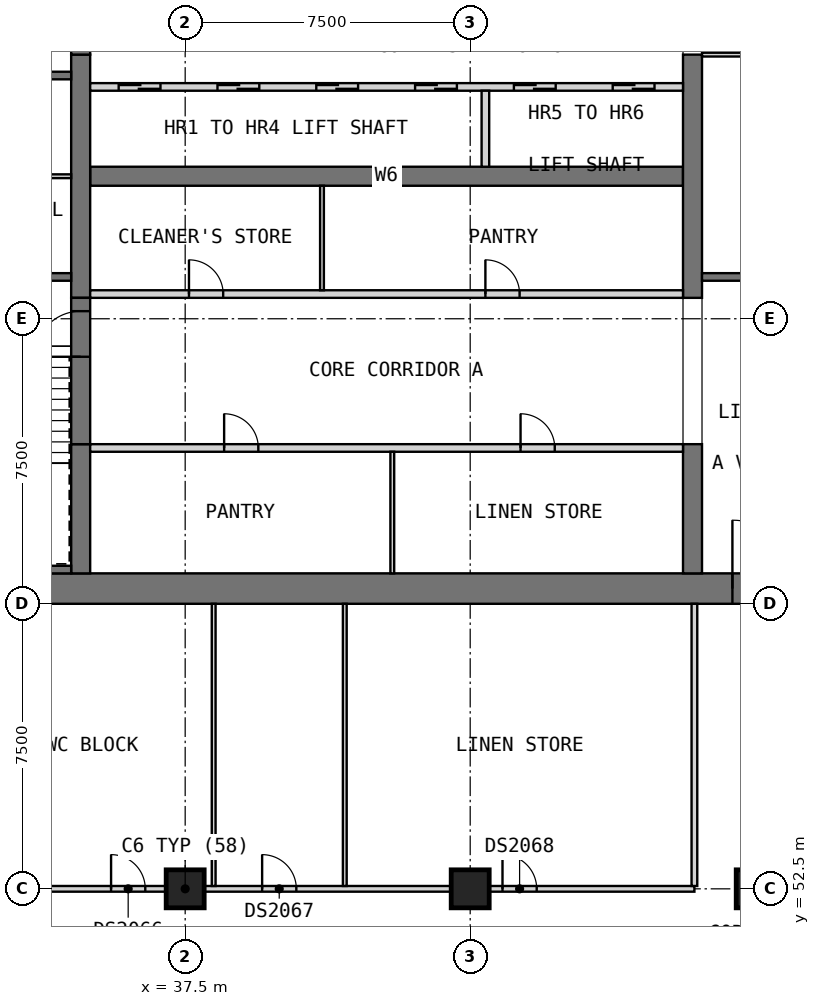
"""IFC4 building model, lengths in metres.
Left out: names, types, materials, properties, quantities, classifications, styles, units other than length and angle.
Written with IfcOpenShell. Run it as: python <this file> out.ifc"""

import sys

from ifc_helpers import new_model, si_unit, direction, frame, frame_2d, origin, origin_2d, place, context, subcontext, project, spatial, rectangle, extrude, element, fill, save


model = new_model("IFC4")
c1 = context("Model", 3, precision=1e-05, world=origin(), true_north=direction((0.0, 1.0)))
c2 = subcontext(c1, "Body", "Model", "MODEL_VIEW")
j1 = project(units=[si_unit("LENGTHUNIT", "METRE"), si_unit("PLANEANGLEUNIT", "RADIAN")], contexts=[c1])
p1 = place(None, origin())
s1 = spatial("IfcSite", under=j1, at=p1, CompositionType="ELEMENT")
p2 = place(p1, origin())
s2 = spatial("IfcBuilding", under=s1, at=p2, CompositionType="ELEMENT")
p3 = place(p2, frame((0.0, 0.0, 133.8)))
s3 = spatial("IfcBuildingStorey", under=s2, at=p3, CompositionType="ELEMENT", Elevation=133.8)
for number, where, z_axis, x_axis in (
    (1, (37.5, 52.5, 0.0), (0.0, 0.0, 1.0), (1.0, 0.0, 0.0)),
    (2, (45.0, 52.5, 0.0), (0.0, 0.0, 1.0), (1.0, 0.0, 0.0)),
    (3, (52.5, 52.5, 0.0), (0.0, 0.0, 1.0), (1.0, 0.0, 0.0)),
):
    element("IfcColumn", number, at=place(p3, frame(where, z_axis=z_axis, x_axis=x_axis)), inside=s3, PredefinedType="COLUMN", context=c2, shape_type="SweptSolid", body=[
        extrude(rectangle(XDim=1.0, YDim=1.0, at=origin_2d()), origin(), (0.0, 0.0, 1.0), 3.6),
    ])
p4 = place(p3, frame((30.0, 60.4, 0.0), z_axis=(0.0, 0.0, 1.0), x_axis=(1.0, 0.0, 0.0)))
e4 = element("IfcWall", 4, at=p4, inside=s3, PredefinedType="SHEAR", context=c2, shape_type="SweptSolid", body=[
    extrude(rectangle(XDim=30.0, YDim=0.8, at=frame_2d((15.0, 0.0))), origin(), (0.0, 0.0, 1.0), 3.6),
])
p5 = place(p4, frame((21.9, 0.0, 0.0)))
e5 = element("IfcOpeningElement", 5, at=p5, cuts=e4, PredefinedType="OPENING", context=c2, shape_type="SweptSolid", body=[
    extrude(rectangle(XDim=1.8, YDim=2.1, at=frame_2d((0.9, 1.05))), frame((0.0, 0.41, 0.0), z_axis=(0.0, -1.0, 0.0), x_axis=(1.0, 0.0, 0.0)), (0.0, 0.0, 1.0), 0.82),
])
p6 = place(p4, frame((26.5, 0.0, 0.0)))
e6 = element("IfcOpeningElement", 6, at=p6, cuts=e4, PredefinedType="OPENING", context=c2, shape_type="SweptSolid", body=[
    extrude(rectangle(XDim=1.2, YDim=2.1, at=frame_2d((0.6, 1.05))), frame((0.0, 0.41, 0.0), z_axis=(0.0, -1.0, 0.0), x_axis=(1.0, 0.0, 0.0)), (0.0, 0.0, 1.0), 0.82),
])
p7 = place(p3, frame((35.0, 71.25, 0.0), z_axis=(0.0, 0.0, 1.0), x_axis=(1.0, 0.0, 0.0)))
e7 = element("IfcWall", 7, at=p7, inside=s3, PredefinedType="SHEAR", context=c2, shape_type="SweptSolid", body=[
    extrude(rectangle(XDim=15.6, YDim=0.5, at=frame_2d((7.8, 0.0))), origin(), (0.0, 0.0, 1.0), 3.6),
])
p8 = place(p3, frame((34.75, 60.8, 0.0), z_axis=(0.0, 0.0, 1.0), x_axis=(0.0, 1.0, 0.0)))
e8 = element("IfcWall", 8, at=p8, inside=s3, PredefinedType="SHEAR", context=c2, shape_type="SweptSolid", body=[
    extrude(rectangle(XDim=3.4, YDim=0.5, at=frame_2d((1.7, 0.0))), origin(), (0.0, 0.0, 1.0), 3.6),
])
p9 = place(p3, frame((34.75, 68.05, 0.0), z_axis=(0.0, 0.0, 1.0), x_axis=(0.0, 1.0, 0.0)))
e9 = element("IfcWall", 9, at=p9, inside=s3, PredefinedType="SHEAR", context=c2, shape_type="SweptSolid", body=[
    extrude(rectangle(XDim=6.4, YDim=0.5, at=frame_2d((3.2, 0.0))), origin(), (0.0, 0.0, 1.0), 3.6),
])
p10 = place(p3, frame((50.85, 60.8, 0.0), z_axis=(0.0, 0.0, 1.0), x_axis=(0.0, 1.0, 0.0)))
e10 = element("IfcWall", 10, at=p10, inside=s3, PredefinedType="SHEAR", context=c2, shape_type="SweptSolid", body=[
    extrude(rectangle(XDim=3.4, YDim=0.5, at=frame_2d((1.7, 0.0))), origin(), (0.0, 0.0, 1.0), 3.6),
])
p11 = place(p3, frame((50.85, 68.05, 0.0), z_axis=(0.0, 0.0, 1.0), x_axis=(0.0, 1.0, 0.0)))
e11 = element("IfcWall", 11, at=p11, inside=s3, PredefinedType="SHEAR", context=c2, shape_type="SweptSolid", body=[
    extrude(rectangle(XDim=6.4, YDim=0.5, at=frame_2d((3.2, 0.0))), origin(), (0.0, 0.0, 1.0), 3.6),
])
p12 = place(p3, frame((35.0, 64.1, 0.0), z_axis=(0.0, 0.0, 1.0), x_axis=(1.0, 0.0, 0.0)))
e12 = element("IfcWall", 12, at=p12, inside=s3, PredefinedType="PARTITIONING", context=c2, shape_type="SweptSolid", body=[
    extrude(rectangle(XDim=15.6, YDim=0.2, at=frame_2d((7.8, 0.0))), origin(), (0.0, 0.0, 1.0), 3.35),
])
p13 = place(p12, frame((3.525, 0.0, 0.0)))
e13 = element("IfcOpeningElement", 13, at=p13, cuts=e12, PredefinedType="OPENING", context=c2, shape_type="SweptSolid", body=[
    extrude(rectangle(XDim=0.9, YDim=2.1, at=frame_2d((0.45, 1.05))), frame((0.0, 0.11, 0.0), z_axis=(0.0, -1.0, 0.0), x_axis=(1.0, 0.0, 0.0)), (0.0, 0.0, 1.0), 0.22),
])
p14 = place(p12, frame((11.325, 0.0, 0.0)))
e14 = element("IfcOpeningElement", 14, at=p14, cuts=e12, PredefinedType="OPENING", context=c2, shape_type="SweptSolid", body=[
    extrude(rectangle(XDim=0.9, YDim=2.1, at=frame_2d((0.45, 1.05))), frame((0.0, 0.11, 0.0), z_axis=(0.0, -1.0, 0.0), x_axis=(1.0, 0.0, 0.0)), (0.0, 0.0, 1.0), 0.22),
])
p15 = place(p3, frame((42.95, 60.8, 0.0), z_axis=(0.0, 0.0, 1.0), x_axis=(0.0, 1.0, 0.0)))
e15 = element("IfcWall", 15, at=p15, inside=s3, PredefinedType="PARTITIONING", context=c2, shape_type="SweptSolid", body=[
    extrude(rectangle(XDim=3.2, YDim=0.1, at=frame_2d((1.6, 0.0))), origin(), (0.0, 0.0, 1.0), 3.35),
])
p16 = place(p3, frame((35.0, 68.15, 0.0), z_axis=(0.0, 0.0, 1.0), x_axis=(1.0, 0.0, 0.0)))
e16 = element("IfcWall", 16, at=p16, inside=s3, PredefinedType="PARTITIONING", context=c2, shape_type="SweptSolid", body=[
    extrude(rectangle(XDim=15.6, YDim=0.2, at=frame_2d((7.8, 0.0))), origin(), (0.0, 0.0, 1.0), 3.35),
])
p17 = place(p16, frame((2.6, 0.0, 0.0)))
e17 = element("IfcOpeningElement", 17, at=p17, cuts=e16, PredefinedType="OPENING", context=c2, shape_type="SweptSolid", body=[
    extrude(rectangle(XDim=0.9, YDim=2.1, at=frame_2d((0.45, 1.05))), frame((0.0, 0.11, 0.0), z_axis=(0.0, -1.0, 0.0), x_axis=(1.0, 0.0, 0.0)), (0.0, 0.0, 1.0), 0.22),
])
p18 = place(p16, frame((10.4, 0.0, 0.0)))
e18 = element("IfcOpeningElement", 18, at=p18, cuts=e16, PredefinedType="OPENING", context=c2, shape_type="SweptSolid", body=[
    extrude(rectangle(XDim=0.9, YDim=2.1, at=frame_2d((0.45, 1.05))), frame((0.0, 0.11, 0.0), z_axis=(0.0, -1.0, 0.0), x_axis=(1.0, 0.0, 0.0)), (0.0, 0.0, 1.0), 0.22),
])
p19 = place(p3, frame((41.1, 68.25, 0.0), z_axis=(0.0, 0.0, 1.0), x_axis=(0.0, 1.0, 0.0)))
e19 = element("IfcWall", 19, at=p19, inside=s3, PredefinedType="PARTITIONING", context=c2, shape_type="SweptSolid", body=[
    extrude(rectangle(XDim=2.75, YDim=0.1, at=frame_2d((1.375, 0.0))), origin(), (0.0, 0.0, 1.0), 3.35),
])
p20 = place(p3, frame((35.0, 73.6, 0.0), z_axis=(0.0, 0.0, 1.0), x_axis=(1.0, 0.0, 0.0)))
e20 = element("IfcWall", 20, at=p20, inside=s3, PredefinedType="SOLIDWALL", context=c2, shape_type="SweptSolid", body=[
    extrude(rectangle(XDim=15.6, YDim=0.2, at=frame_2d((7.8, 0.0))), origin(), (0.0, 0.0, 1.0), 3.6),
])
p21 = place(p20, frame((0.75, 0.0, 0.0)))
e21 = element("IfcOpeningElement", 21, at=p21, cuts=e20, PredefinedType="OPENING", context=c2, shape_type="SweptSolid", body=[
    extrude(rectangle(XDim=1.1, YDim=2.1, at=frame_2d((0.55, 1.05))), frame((0.0, 0.11, 0.0), z_axis=(0.0, -1.0, 0.0), x_axis=(1.0, 0.0, 0.0)), (0.0, 0.0, 1.0), 0.22),
])
p22 = place(p20, frame((3.35, 0.0, 0.0)))
e22 = element("IfcOpeningElement", 22, at=p22, cuts=e20, PredefinedType="OPENING", context=c2, shape_type="SweptSolid", body=[
    extrude(rectangle(XDim=1.1, YDim=2.1, at=frame_2d((0.55, 1.05))), frame((0.0, 0.11, 0.0), z_axis=(0.0, -1.0, 0.0), x_axis=(1.0, 0.0, 0.0)), (0.0, 0.0, 1.0), 0.22),
])
p23 = place(p20, frame((5.95, 0.0, 0.0)))
e23 = element("IfcOpeningElement", 23, at=p23, cuts=e20, PredefinedType="OPENING", context=c2, shape_type="SweptSolid", body=[
    extrude(rectangle(XDim=1.1, YDim=2.1, at=frame_2d((0.55, 1.05))), frame((0.0, 0.11, 0.0), z_axis=(0.0, -1.0, 0.0), x_axis=(1.0, 0.0, 0.0)), (0.0, 0.0, 1.0), 0.22),
])
p24 = place(p20, frame((8.55, 0.0, 0.0)))
e24 = element("IfcOpeningElement", 24, at=p24, cuts=e20, PredefinedType="OPENING", context=c2, shape_type="SweptSolid", body=[
    extrude(rectangle(XDim=1.1, YDim=2.1, at=frame_2d((0.55, 1.05))), frame((0.0, 0.11, 0.0), z_axis=(0.0, -1.0, 0.0), x_axis=(1.0, 0.0, 0.0)), (0.0, 0.0, 1.0), 0.22),
])
p25 = place(p20, frame((11.15, 0.0, 0.0)))
e25 = element("IfcOpeningElement", 25, at=p25, cuts=e20, PredefinedType="OPENING", context=c2, shape_type="SweptSolid", body=[
    extrude(rectangle(XDim=1.1, YDim=2.1, at=frame_2d((0.55, 1.05))), frame((0.0, 0.11, 0.0), z_axis=(0.0, -1.0, 0.0), x_axis=(1.0, 0.0, 0.0)), (0.0, 0.0, 1.0), 0.22),
])
p26 = place(p20, frame((13.75, 0.0, 0.0)))
e26 = element("IfcOpeningElement", 26, at=p26, cuts=e20, PredefinedType="OPENING", context=c2, shape_type="SweptSolid", body=[
    extrude(rectangle(XDim=1.1, YDim=2.1, at=frame_2d((0.55, 1.05))), frame((0.0, 0.11, 0.0), z_axis=(0.0, -1.0, 0.0), x_axis=(1.0, 0.0, 0.0)), (0.0, 0.0, 1.0), 0.22),
])
p27 = place(p3, frame((45.4, 71.5, 0.0), z_axis=(0.0, 0.0, 1.0), x_axis=(0.0, 1.0, 0.0)))
e27 = element("IfcWall", 27, at=p27, inside=s3, PredefinedType="SOLIDWALL", context=c2, shape_type="SweptSolid", body=[
    extrude(rectangle(XDim=2.0, YDim=0.2, at=frame_2d((1.0, 0.0))), origin(), (0.0, 0.0, 1.0), 3.6),
])
p28 = place(p3, frame((34.75, 64.2, 0.0), z_axis=(0.0, 0.0, 1.0), x_axis=(0.0, 1.0, 0.0)))
e28 = element("IfcWall", 28, at=p28, inside=s3, PredefinedType="SOLIDWALL", context=c2, shape_type="SweptSolid", body=[
    extrude(rectangle(XDim=3.85, YDim=0.5, at=frame_2d((1.925, 0.0))), origin(), (0.0, 0.0, 1.0), 2.4),
])
p29 = place(p28, frame((2.3, 0.0, 0.0)))
e29 = element("IfcOpeningElement", 29, at=p29, cuts=e28, PredefinedType="OPENING", context=c2, shape_type="SweptSolid", body=[
    extrude(rectangle(XDim=1.2, YDim=2.1, at=frame_2d((0.6, 1.05))), frame((0.0, 0.26, 0.0), z_axis=(0.0, -1.0, 0.0), x_axis=(1.0, 0.0, 0.0)), (0.0, 0.0, 1.0), 0.52),
])
p30 = place(p3, frame((34.75, 74.45, 0.0), z_axis=(0.0, 0.0, 1.0), x_axis=(0.0, 1.0, 0.0)))
e30 = element("IfcWall", 30, at=p30, inside=s3, PredefinedType="SOLIDWALL", context=c2, shape_type="SweptSolid", body=[
    extrude(rectangle(XDim=3.85, YDim=0.5, at=frame_2d((1.925, 0.0))), origin(), (0.0, 0.0, 1.0), 2.4),
])
p31 = place(p30, frame((1.0, 0.0, 0.0)))
e31 = element("IfcOpeningElement", 31, at=p31, cuts=e30, PredefinedType="OPENING", context=c2, shape_type="SweptSolid", body=[
    extrude(rectangle(XDim=1.2, YDim=2.1, at=frame_2d((0.6, 1.05))), frame((0.0, 0.26, 0.0), z_axis=(0.0, -1.0, 0.0), x_axis=(1.0, 0.0, 0.0)), (0.0, 0.0, 1.0), 0.52),
])
p32 = place(p3, frame((30.8, 68.6, 0.0), z_axis=(0.0, 0.0, 1.0), x_axis=(1.0, 0.0, 0.0)))
e32 = element("IfcWall", 32, at=p32, inside=s3, PredefinedType="SOLIDWALL", context=c2, shape_type="SweptSolid", body=[
    extrude(rectangle(XDim=3.7, YDim=0.2, at=frame_2d((1.85, 0.0))), origin(), (0.0, 0.0, 1.0), 3.35),
])
p33 = place(p32, frame((1.5, 0.0, 0.0)))
e33 = element("IfcOpeningElement", 33, at=p33, cuts=e32, PredefinedType="OPENING", context=c2, shape_type="SweptSolid", body=[
    extrude(rectangle(XDim=0.9, YDim=2.1, at=frame_2d((0.45, 1.05))), frame((0.0, 0.11, 0.0), z_axis=(0.0, -1.0, 0.0), x_axis=(1.0, 0.0, 0.0)), (0.0, 0.0, 1.0), 0.22),
])
p34 = place(p3, frame((30.8, 73.9, 0.0), z_axis=(0.0, 0.0, 1.0), x_axis=(1.0, 0.0, 0.0)))
e34 = element("IfcWall", 34, at=p34, inside=s3, PredefinedType="SOLIDWALL", context=c2, shape_type="SweptSolid", body=[
    extrude(rectangle(XDim=3.7, YDim=0.2, at=frame_2d((1.85, 0.0))), origin(), (0.0, 0.0, 1.0), 3.35),
])
p35 = place(p34, frame((1.5, 0.0, 0.0)))
e35 = element("IfcOpeningElement", 35, at=p35, cuts=e34, PredefinedType="OPENING", context=c2, shape_type="SweptSolid", body=[
    extrude(rectangle(XDim=0.9, YDim=2.1, at=frame_2d((0.45, 1.05))), frame((0.0, 0.11, 0.0), z_axis=(0.0, -1.0, 0.0), x_axis=(1.0, 0.0, 0.0)), (0.0, 0.0, 1.0), 0.22),
])
p36 = place(p3, frame((51.1, 68.6, 0.0), z_axis=(0.0, 0.0, 1.0), x_axis=(1.0, 0.0, 0.0)))
e36 = element("IfcWall", 36, at=p36, inside=s3, PredefinedType="SOLIDWALL", context=c2, shape_type="SweptSolid", body=[
    extrude(rectangle(XDim=8.1, YDim=0.2, at=frame_2d((4.05, 0.0))), origin(), (0.0, 0.0, 1.0), 3.35),
])
p37 = place(p3, frame((31.0, 60.9, 0.0), z_axis=(0.0, 0.0, 1.0), x_axis=(1.0, 0.0, 0.0)))
e37 = element("IfcWall", 37, at=p37, inside=s3, PredefinedType="SOLIDWALL", context=c2, shape_type="SweptSolid", body=[
    extrude(rectangle(XDim=3.5, YDim=0.2, at=frame_2d((1.75, 0.0))), origin(), (0.0, 0.0, 1.0), 3.35),
])
p38 = place(p3, frame((30.8, 71.25, 0.0), z_axis=(0.0, 0.0, 1.0), x_axis=(1.0, 0.0, 0.0)))
e38 = element("IfcWall", 38, at=p38, inside=s3, PredefinedType="PARTITIONING", context=c2, shape_type="SweptSolid", body=[
    extrude(rectangle(XDim=3.7, YDim=0.1, at=frame_2d((1.85, 0.0))), origin(), (0.0, 0.0, 1.0), 3.35),
])
p39 = place(p3, frame((51.1, 74.45, 0.0), z_axis=(0.0, 0.0, 1.0), x_axis=(1.0, 0.0, 0.0)))
e39 = element("IfcWall", 39, at=p39, inside=s3, PredefinedType="PARTITIONING", context=c2, shape_type="SweptSolid", body=[
    extrude(rectangle(XDim=8.1, YDim=0.1, at=frame_2d((4.05, 0.0))), origin(), (0.0, 0.0, 1.0), 3.35),
])
p40 = place(p39, frame((3.6, 0.0, 0.0)))
e40 = element("IfcOpeningElement", 40, at=p40, cuts=e39, PredefinedType="OPENING", context=c2, shape_type="SweptSolid", body=[
    extrude(rectangle(XDim=0.9, YDim=2.1, at=frame_2d((0.45, 1.05))), frame((0.0, 0.06, 0.0), z_axis=(0.0, -1.0, 0.0), x_axis=(1.0, 0.0, 0.0)), (0.0, 0.0, 1.0), 0.12),
])
p41 = place(p3, frame((33.75, 52.5, 0.0), z_axis=(0.0, 0.0, 1.0), x_axis=(1.0, 0.0, 0.0)))
e41 = element("IfcWall", 41, at=p41, inside=s3, PredefinedType="PARTITIONING", context=c2, shape_type="SweptSolid", body=[
    extrude(rectangle(XDim=17.15, YDim=0.15, at=frame_2d((8.575, 0.0))), origin(), (0.0, 0.0, 1.0), 3.35),
])
p42 = place(p41, frame((1.8, 0.0, 0.0)))
e42 = element("IfcOpeningElement", 42, at=p42, cuts=e41, PredefinedType="OPENING", context=c2, shape_type="SweptSolid", body=[
    extrude(rectangle(XDim=0.9, YDim=2.1, at=frame_2d((0.45, 1.05))), frame((0.0, 0.085, 0.0), z_axis=(0.0, -1.0, 0.0), x_axis=(1.0, 0.0, 0.0)), (0.0, 0.0, 1.0), 0.17),
])
p43 = place(p41, frame((5.775, 0.0, 0.0)))
e43 = element("IfcOpeningElement", 43, at=p43, cuts=e41, PredefinedType="OPENING", context=c2, shape_type="SweptSolid", body=[
    extrude(rectangle(XDim=0.9, YDim=2.1, at=frame_2d((0.45, 1.05))), frame((0.0, 0.085, 0.0), z_axis=(0.0, -1.0, 0.0), x_axis=(1.0, 0.0, 0.0)), (0.0, 0.0, 1.0), 0.17),
])
p44 = place(p41, frame((12.1, 0.0, 0.0)))
e44 = element("IfcOpeningElement", 44, at=p44, cuts=e41, PredefinedType="OPENING", context=c2, shape_type="SweptSolid", body=[
    extrude(rectangle(XDim=0.9, YDim=2.1, at=frame_2d((0.45, 1.05))), frame((0.0, 0.085, 0.0), z_axis=(0.0, -1.0, 0.0), x_axis=(1.0, 0.0, 0.0)), (0.0, 0.0, 1.0), 0.17),
])
for number, where, z_axis, x_axis in (
    (45, (38.25, 52.575, 0.0), (0.0, 0.0, 1.0), (0.0, 1.0, 0.0)),
    (46, (41.7, 52.575, 0.0), (0.0, 0.0, 1.0), (0.0, 1.0, 0.0)),
):
    element("IfcWall", number, at=place(p3, frame(where, z_axis=z_axis, x_axis=x_axis)), inside=s3, PredefinedType="PARTITIONING", context=c2, shape_type="SweptSolid", body=[
        extrude(rectangle(XDim=7.425, YDim=0.1, at=frame_2d((3.712, 0.0))), origin(), (0.0, 0.0, 1.0), 3.35),
    ])
p45 = place(p3, frame((50.9, 52.575, 0.0), z_axis=(0.0, 0.0, 1.0), x_axis=(0.0, 1.0, 0.0)))
e47 = element("IfcWall", 47, at=p45, inside=s3, PredefinedType="PARTITIONING", context=c2, shape_type="SweptSolid", body=[
    extrude(rectangle(XDim=7.425, YDim=0.15, at=frame_2d((3.712, 0.0))), origin(), (0.0, 0.0, 1.0), 3.35),
])
p46 = place(p13, origin())
e48 = element("IfcDoor", 48, at=p46, inside=s3, OperationType="SINGLE_SWING_RIGHT", PredefinedType="DOOR", context=c2, shape_type="SweptSolid", body=[
    extrude(rectangle(XDim=0.9, YDim=2.1, at=frame_2d((0.45, 1.05))), frame((0.0, 0.025, 0.0), z_axis=(0.0, -1.0, 0.0), x_axis=(1.0, 0.0, 0.0)), (0.0, 0.0, 1.0), 0.05),
])
fill(e13, e48)
p47 = place(p14, origin())
e49 = element("IfcDoor", 49, at=p47, inside=s3, OperationType="SINGLE_SWING_LEFT", PredefinedType="DOOR", context=c2, shape_type="SweptSolid", body=[
    extrude(rectangle(XDim=0.9, YDim=2.1, at=frame_2d((0.45, 1.05))), frame((0.0, 0.025, 0.0), z_axis=(0.0, -1.0, 0.0), x_axis=(1.0, 0.0, 0.0)), (0.0, 0.0, 1.0), 0.05),
])
fill(e14, e49)
p48 = place(p17, origin())
e50 = element("IfcDoor", 50, at=p48, inside=s3, OperationType="SINGLE_SWING_RIGHT", PredefinedType="DOOR", context=c2, shape_type="SweptSolid", body=[
    extrude(rectangle(XDim=0.9, YDim=2.1, at=frame_2d((0.45, 1.05))), frame((0.0, 0.025, 0.0), z_axis=(0.0, -1.0, 0.0), x_axis=(1.0, 0.0, 0.0)), (0.0, 0.0, 1.0), 0.05),
])
fill(e17, e50)
p49 = place(p18, origin())
e51 = element("IfcDoor", 51, at=p49, inside=s3, OperationType="SINGLE_SWING_LEFT", PredefinedType="DOOR", context=c2, shape_type="SweptSolid", body=[
    extrude(rectangle(XDim=0.9, YDim=2.1, at=frame_2d((0.45, 1.05))), frame((0.0, 0.025, 0.0), z_axis=(0.0, -1.0, 0.0), x_axis=(1.0, 0.0, 0.0)), (0.0, 0.0, 1.0), 0.05),
])
fill(e18, e51)
p50 = place(p21, origin())
e52 = element("IfcDoor", 52, at=p50, inside=s3, OperationType="DOUBLE_DOOR_SLIDING", PredefinedType="DOOR", context=c2, shape_type="SweptSolid", body=[
    extrude(rectangle(XDim=1.1, YDim=2.1, at=frame_2d((0.55, 1.05))), frame((0.0, 0.025, 0.0), z_axis=(0.0, -1.0, 0.0), x_axis=(1.0, 0.0, 0.0)), (0.0, 0.0, 1.0), 0.05),
])
fill(e21, e52)
p51 = place(p22, origin())
e53 = element("IfcDoor", 53, at=p51, inside=s3, OperationType="DOUBLE_DOOR_SLIDING", PredefinedType="DOOR", context=c2, shape_type="SweptSolid", body=[
    extrude(rectangle(XDim=1.1, YDim=2.1, at=frame_2d((0.55, 1.05))), frame((0.0, 0.025, 0.0), z_axis=(0.0, -1.0, 0.0), x_axis=(1.0, 0.0, 0.0)), (0.0, 0.0, 1.0), 0.05),
])
fill(e22, e53)
p52 = place(p23, origin())
e54 = element("IfcDoor", 54, at=p52, inside=s3, OperationType="DOUBLE_DOOR_SLIDING", PredefinedType="DOOR", context=c2, shape_type="SweptSolid", body=[
    extrude(rectangle(XDim=1.1, YDim=2.1, at=frame_2d((0.55, 1.05))), frame((0.0, 0.025, 0.0), z_axis=(0.0, -1.0, 0.0), x_axis=(1.0, 0.0, 0.0)), (0.0, 0.0, 1.0), 0.05),
])
fill(e23, e54)
p53 = place(p24, origin())
e55 = element("IfcDoor", 55, at=p53, inside=s3, OperationType="DOUBLE_DOOR_SLIDING", PredefinedType="DOOR", context=c2, shape_type="SweptSolid", body=[
    extrude(rectangle(XDim=1.1, YDim=2.1, at=frame_2d((0.55, 1.05))), frame((0.0, 0.025, 0.0), z_axis=(0.0, -1.0, 0.0), x_axis=(1.0, 0.0, 0.0)), (0.0, 0.0, 1.0), 0.05),
])
fill(e24, e55)
p54 = place(p25, origin())
e56 = element("IfcDoor", 56, at=p54, inside=s3, OperationType="DOUBLE_DOOR_SLIDING", PredefinedType="DOOR", context=c2, shape_type="SweptSolid", body=[
    extrude(rectangle(XDim=1.1, YDim=2.1, at=frame_2d((0.55, 1.05))), frame((0.0, 0.025, 0.0), z_axis=(0.0, -1.0, 0.0), x_axis=(1.0, 0.0, 0.0)), (0.0, 0.0, 1.0), 0.05),
])
fill(e25, e56)
p55 = place(p26, origin())
e57 = element("IfcDoor", 57, at=p55, inside=s3, OperationType="DOUBLE_DOOR_SLIDING", PredefinedType="DOOR", context=c2, shape_type="SweptSolid", body=[
    extrude(rectangle(XDim=1.1, YDim=2.1, at=frame_2d((0.55, 1.05))), frame((0.0, 0.025, 0.0), z_axis=(0.0, -1.0, 0.0), x_axis=(1.0, 0.0, 0.0)), (0.0, 0.0, 1.0), 0.05),
])
fill(e26, e57)
p56 = place(p5, origin())
e58 = element("IfcDoor", 58, at=p56, inside=s3, OperationType="DOUBLE_DOOR_SINGLE_SWING", PredefinedType="DOOR", context=c2, shape_type="SweptSolid", body=[
    extrude(rectangle(XDim=1.8, YDim=2.1, at=frame_2d((0.9, 1.05))), frame((0.0, 0.025, 0.0), z_axis=(0.0, -1.0, 0.0), x_axis=(1.0, 0.0, 0.0)), (0.0, 0.0, 1.0), 0.05),
])
fill(e5, e58)
p57 = place(p29, origin())
e59 = element("IfcDoor", 59, at=p57, inside=s3, OperationType="SINGLE_SWING_LEFT", PredefinedType="DOOR", context=c2, shape_type="SweptSolid", body=[
    extrude(rectangle(XDim=1.2, YDim=2.1, at=frame_2d((0.6, 1.05))), frame((0.0, 0.025, 0.0), z_axis=(0.0, -1.0, 0.0), x_axis=(1.0, 0.0, 0.0)), (0.0, 0.0, 1.0), 0.05),
])
fill(e29, e59)
p58 = place(p42, origin())
e60 = element("IfcDoor", 60, at=p58, inside=s3, OperationType="SINGLE_SWING_LEFT", PredefinedType="DOOR", context=c2, shape_type="SweptSolid", body=[
    extrude(rectangle(XDim=0.9, YDim=2.1, at=frame_2d((0.45, 1.05))), frame((0.0, 0.025, 0.0), z_axis=(0.0, -1.0, 0.0), x_axis=(1.0, 0.0, 0.0)), (0.0, 0.0, 1.0), 0.05),
])
fill(e42, e60)
p59 = place(p43, origin())
e61 = element("IfcDoor", 61, at=p59, inside=s3, OperationType="SINGLE_SWING_LEFT", PredefinedType="DOOR", context=c2, shape_type="SweptSolid", body=[
    extrude(rectangle(XDim=0.9, YDim=2.1, at=frame_2d((0.45, 1.05))), frame((0.0, 0.025, 0.0), z_axis=(0.0, -1.0, 0.0), x_axis=(1.0, 0.0, 0.0)), (0.0, 0.0, 1.0), 0.05),
])
fill(e43, e61)
p60 = place(p44, origin())
e62 = element("IfcDoor", 62, at=p60, inside=s3, OperationType="SINGLE_SWING_LEFT", PredefinedType="DOOR", context=c2, shape_type="SweptSolid", body=[
    extrude(rectangle(XDim=0.9, YDim=2.1, at=frame_2d((0.45, 1.05))), frame((0.0, 0.025, 0.0), z_axis=(0.0, -1.0, 0.0), x_axis=(1.0, 0.0, 0.0)), (0.0, 0.0, 1.0), 0.05),
])
fill(e44, e62)
save(model, sys.argv[1])
